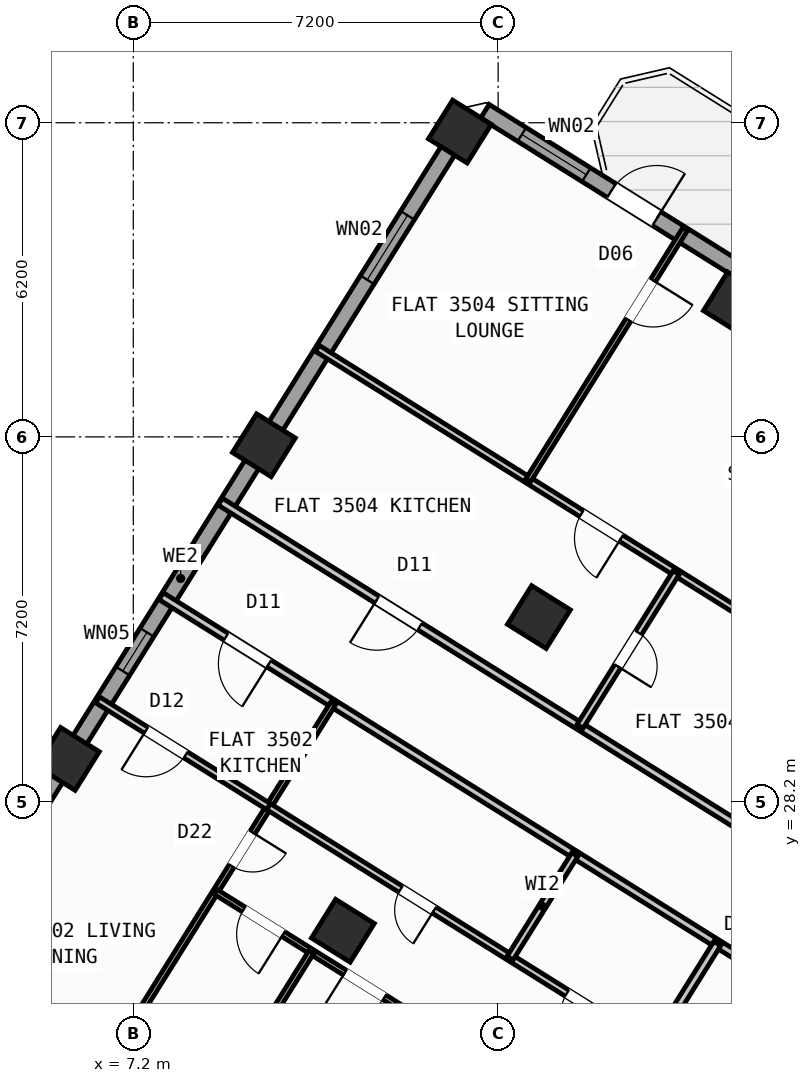
"""IFC4 building model, lengths in metres.
Left out: names, types, materials, properties, quantities, classifications, styles, units other than length and angle.
Written with IfcOpenShell. Run it as: python <this file> out.ifc"""

import sys

from ifc_helpers import new_model, si_unit, direction, frame, frame_2d, origin, origin_2d, place, context, subcontext, project, spatial, rectangle, hollow_rectangle, extrude, source, transform, mapped, element, fill, save


model = new_model("IFC4")
c1 = context("Model", 3, precision=1e-05, world=origin(), true_north=direction((0.0, 1.0)))
c2 = subcontext(c1, "Body", "Model", "MODEL_VIEW")
j1 = project(units=[si_unit("LENGTHUNIT", "METRE"), si_unit("PLANEANGLEUNIT", "RADIAN")], contexts=[c1])
p1 = place(None, origin())
s1 = spatial("IfcSite", under=j1, at=p1, CompositionType="ELEMENT")
p2 = place(p1, origin())
s2 = spatial("IfcBuilding", under=s1, at=p2, CompositionType="ELEMENT")
p3 = place(p2, frame((0.0, 0.0, 140.7)))
s3 = spatial("IfcBuildingStorey", under=s2, at=p3, CompositionType="ELEMENT", Elevation=140.7)
m1 = source(origin(), c2, "Body", "SweptSolid", [
    extrude(hollow_rectangle(XDim=0.9, YDim=0.9, WallThickness=0.036, at=origin_2d()), origin(), (0.0, 0.0, 1.0), 3.6),
])
for number, where, z_axis, x_axis in (
    (1, (19.073, 38.034, 0.0), (0.0, 0.0, 1.0), (-0.848, 0.53, 0.0)),
    (2, (15.205, 31.844, 0.0), (0.0, 0.0, 1.0), (-0.848, 0.53, 0.0)),
    (3, (11.336, 25.653, 0.0), (0.0, 0.0, 1.0), (-0.848, 0.53, 0.0)),
    (4, (13.646, 41.426, 0.0), (0.0, 0.0, 1.0), (-0.848, 0.53, 0.0)),
    (5, (9.777, 35.235, 0.0), (0.0, 0.0, 1.0), (-0.848, 0.53, 0.0)),
    (6, (5.909, 29.044, 0.0), (0.0, 0.0, 1.0), (-0.848, 0.53, 0.0)),
):
    element("IfcColumn", number, at=place(p3, frame(where, z_axis=z_axis, x_axis=x_axis)), inside=s3, PredefinedType="COLUMN", context=c2, shape_type="MappedRepresentation", body=[
        mapped(m1, transform((0.0, 0.0, 0.0), scale=1.0)),
    ])
p4 = place(p3, frame((2.415, 23.452, 0.0), z_axis=(0.0, 0.0, 1.0), x_axis=(0.52991049553, 0.848053575387, 0.0)))
e7 = element("IfcWall", 7, at=p4, inside=s3, PredefinedType="STANDARD", context=c2, shape_type="SweptSolid", body=[
    extrude(rectangle(XDim=21.587, YDim=0.32, at=frame_2d((10.794, 0.0))), origin(), (0.0, 0.0, 1.0), 2.775),
])
p5 = place(p4, frame((2.356, 0.0, 0.8)))
e8 = element("IfcOpeningElement", 8, at=p5, cuts=e7, PredefinedType="OPENING", context=c2, shape_type="SweptSolid", body=[
    extrude(rectangle(XDim=2.1, YDim=1.55, at=frame_2d((1.05, 0.775))), frame((0.0, 0.17, 0.0), z_axis=(0.0, -1.0, 0.0), x_axis=(1.0, 0.0, 0.0)), (0.0, 0.0, 1.0), 0.34),
])
p6 = place(p4, frame((8.639, 0.0, 1.0)))
e9 = element("IfcOpeningElement", 9, at=p6, cuts=e7, PredefinedType="OPENING", context=c2, shape_type="SweptSolid", body=[
    extrude(rectangle(XDim=0.9, YDim=1.25, at=frame_2d((0.45, 0.625))), frame((0.0, 0.17, 0.0), z_axis=(0.0, -1.0, 0.0), x_axis=(1.0, 0.0, 0.0)), (0.0, 0.0, 1.0), 0.34),
])
p7 = place(p4, frame((17.744, 0.0, 0.85)))
e10 = element("IfcOpeningElement", 10, at=p7, cuts=e7, PredefinedType="OPENING", context=c2, shape_type="SweptSolid", body=[
    extrude(rectangle(XDim=1.5, YDim=1.5, at=frame_2d((0.75, 0.75))), frame((0.0, 0.17, 0.0), z_axis=(0.0, -1.0, 0.0), x_axis=(1.0, 0.0, 0.0)), (0.0, 0.0, 1.0), 0.34),
])
p8 = place(p3, frame((14.138, 41.825, 0.0), z_axis=(0.0, 0.0, 1.0), x_axis=(0.848046498049, -0.529921821731, 0.0)))
e11 = element("IfcWall", 11, at=p8, inside=s3, PredefinedType="STANDARD", context=c2, shape_type="SweptSolid", body=[
    extrude(rectangle(XDim=31.588, YDim=0.32, at=frame_2d((15.794, 0.0))), origin(), (0.0, 0.0, 1.0), 3.35),
])
p9 = place(p8, frame((2.949, 0.0, 0.0)))
e12 = element("IfcOpeningElement", 12, at=p9, cuts=e11, PredefinedType="OPENING", context=c2, shape_type="SweptSolid", body=[
    extrude(rectangle(XDim=1.05, YDim=2.15, at=frame_2d((0.525, 1.075))), frame((0.0, 0.17, 0.0), z_axis=(0.0, -1.0, 0.0), x_axis=(1.0, 0.0, 0.0)), (0.0, 0.0, 1.0), 0.34),
])
p10 = place(p8, frame((0.861, 0.0, 0.85)))
e13 = element("IfcOpeningElement", 13, at=p10, cuts=e11, PredefinedType="OPENING", context=c2, shape_type="SweptSolid", body=[
    extrude(rectangle(XDim=1.5, YDim=1.5, at=frame_2d((0.75, 0.75))), frame((0.0, 0.17, 0.0), z_axis=(0.0, -1.0, 0.0), x_axis=(1.0, 0.0, 0.0)), (0.0, 0.0, 1.0), 0.34),
])
p11 = place(p8, frame((8.494, 0.0, 0.85)))
e14 = element("IfcOpeningElement", 14, at=p11, cuts=e11, PredefinedType="OPENING", context=c2, shape_type="SweptSolid", body=[
    extrude(rectangle(XDim=1.8, YDim=1.5, at=frame_2d((0.9, 0.75))), frame((0.0, 0.17, 0.0), z_axis=(0.0, -1.0, 0.0), x_axis=(1.0, 0.0, 0.0)), (0.0, 0.0, 1.0), 0.34),
])
p12 = place(p8, frame((13.874, 0.0, 0.85)))
e15 = element("IfcOpeningElement", 15, at=p12, cuts=e11, PredefinedType="OPENING", context=c2, shape_type="SweptSolid", body=[
    extrude(rectangle(XDim=1.5, YDim=1.5, at=frame_2d((0.75, 0.75))), frame((0.0, 0.17, 0.0), z_axis=(0.0, -1.0, 0.0), x_axis=(1.0, 0.0, 0.0)), (0.0, 0.0, 1.0), 0.34),
])
p13 = place(p8, frame((17.104, 0.0, 1.0)))
e16 = element("IfcOpeningElement", 16, at=p13, cuts=e11, PredefinedType="OPENING", context=c2, shape_type="SweptSolid", body=[
    extrude(rectangle(XDim=0.9, YDim=1.25, at=frame_2d((0.45, 0.625))), frame((0.0, 0.17, 0.0), z_axis=(0.0, -1.0, 0.0), x_axis=(1.0, 0.0, 0.0)), (0.0, 0.0, 1.0), 0.34),
])
p14 = place(p8, frame((22.144, 0.0, 1.0)))
e17 = element("IfcOpeningElement", 17, at=p14, cuts=e11, PredefinedType="OPENING", context=c2, shape_type="SweptSolid", body=[
    extrude(rectangle(XDim=0.9, YDim=1.25, at=frame_2d((0.45, 0.625))), frame((0.0, 0.17, 0.0), z_axis=(0.0, -1.0, 0.0), x_axis=(1.0, 0.0, 0.0)), (0.0, 0.0, 1.0), 0.34),
])
p15 = place(p8, frame((27.744, 0.0, 1.0)))
e18 = element("IfcOpeningElement", 18, at=p15, cuts=e11, PredefinedType="OPENING", context=c2, shape_type="SweptSolid", body=[
    extrude(rectangle(XDim=0.9, YDim=1.25, at=frame_2d((0.45, 0.625))), frame((0.0, 0.17, 0.0), z_axis=(0.0, -1.0, 0.0), x_axis=(1.0, 0.0, 0.0)), (0.0, 0.0, 1.0), 0.34),
])
p16 = place(p3, frame((23.104, 25.256, 0.0), z_axis=(0.0, 0.0, 1.0), x_axis=(-0.848041752158, 0.529929416617, 0.0)))
e19 = element("IfcWall", 19, at=p16, inside=s3, PredefinedType="PARTITIONING", context=c2, shape_type="SweptSolid", body=[
    extrude(rectangle(XDim=16.73, YDim=0.16, at=frame_2d((8.365, 0.0))), origin(), (0.0, 0.0, 1.0), 3.34),
])
p17 = place(p16, frame((2.22, 0.0, 0.0)))
e20 = element("IfcOpeningElement", 20, at=p17, cuts=e19, PredefinedType="OPENING", context=c2, shape_type="SweptSolid", body=[
    extrude(rectangle(XDim=0.86, YDim=2.05, at=frame_2d((0.43, 1.025))), frame((0.0, 0.09, 0.0), z_axis=(0.0, -1.0, 0.0), x_axis=(1.0, 0.0, 0.0)), (0.0, 0.0, 1.0), 0.18),
])
p18 = place(p16, frame((12.084, 0.0, 0.0)))
e21 = element("IfcOpeningElement", 21, at=p18, cuts=e19, PredefinedType="OPENING", context=c2, shape_type="SweptSolid", body=[
    extrude(rectangle(XDim=1.0, YDim=2.1, at=frame_2d((0.5, 1.05))), frame((0.0, 0.09, 0.0), z_axis=(0.0, -1.0, 0.0), x_axis=(1.0, 0.0, 0.0)), (0.0, 0.0, 1.0), 0.18),
])
p19 = place(p3, frame((21.938, 23.391, 0.0), z_axis=(0.0, 0.0, 1.0), x_axis=(-0.848045850158, 0.529922858565, 0.0)))
e22 = element("IfcWall", 22, at=p19, inside=s3, PredefinedType="PARTITIONING", context=c2, shape_type="SweptSolid", body=[
    extrude(rectangle(XDim=16.73, YDim=0.16, at=frame_2d((8.365, 0.0))), origin(), (0.0, 0.0, 1.0), 3.34),
])
p20 = place(p19, frame((2.22, 0.0, 0.0)))
e23 = element("IfcOpeningElement", 23, at=p20, cuts=e22, PredefinedType="OPENING", context=c2, shape_type="SweptSolid", body=[
    extrude(rectangle(XDim=0.86, YDim=2.05, at=frame_2d((0.43, 1.025))), frame((0.0, 0.09, 0.0), z_axis=(0.0, -1.0, 0.0), x_axis=(1.0, 0.0, 0.0)), (0.0, 0.0, 1.0), 0.18),
])
p21 = place(p19, frame((14.22, 0.0, 0.0)))
e24 = element("IfcOpeningElement", 24, at=p21, cuts=e22, PredefinedType="OPENING", context=c2, shape_type="SweptSolid", body=[
    extrude(rectangle(XDim=1.0, YDim=2.1, at=frame_2d((0.5, 1.05))), frame((0.0, 0.09, 0.0), z_axis=(0.0, -1.0, 0.0), x_axis=(1.0, 0.0, 0.0)), (0.0, 0.0, 1.0), 0.18),
])
p22 = place(p3, frame((18.724, 25.399, 0.0), z_axis=(0.0, 0.0, 1.0), x_axis=(-0.529890499457, -0.848066069705, 0.0)))
e25 = element("IfcWall", 25, at=p22, inside=s3, PredefinedType="PARTITIONING", context=c2, shape_type="SweptSolid", body=[
    extrude(rectangle(XDim=3.238, YDim=0.16, at=frame_2d((1.619, 0.0))), origin(), (0.0, 0.0, 1.0), 2.775),
])
p23 = place(p3, frame((20.624, 24.212, 0.0), z_axis=(0.0, 0.0, 1.0), x_axis=(-0.529919283494, -0.848048084121, 0.0)))
e26 = element("IfcWall", 26, at=p23, inside=s3, PredefinedType="PLUMBINGWALL", context=c2, shape_type="SweptSolid", body=[
    extrude(rectangle(XDim=5.51, YDim=0.14, at=frame_2d((2.755, 0.0))), origin(), (0.0, 0.0, 1.0), 2.995),
])
p24 = place(p23, frame((2.365, 0.0, 0.0)))
e27 = element("IfcOpeningElement", 27, at=p24, cuts=e26, PredefinedType="OPENING", context=c2, shape_type="SweptSolid", body=[
    extrude(rectangle(XDim=0.78, YDim=2.05, at=frame_2d((0.39, 1.025))), frame((0.0, 0.08, 0.0), z_axis=(0.0, -1.0, 0.0), x_axis=(1.0, 0.0, 0.0)), (0.0, 0.0, 1.0), 0.16),
])
p25 = place(p3, frame((11.143, 30.136, 0.0), z_axis=(0.0, 0.0, 1.0), x_axis=(-0.529922479612, -0.848046086956, 0.0)))
e28 = element("IfcWall", 28, at=p25, inside=s3, PredefinedType="PARTITIONING", context=c2, shape_type="SweptSolid", body=[
    extrude(rectangle(XDim=10.62, YDim=0.11, at=frame_2d((5.31, 0.0))), origin(), (0.0, 0.0, 1.0), 3.34),
])
p26 = place(p25, frame((3.0, 0.0, 0.0)))
e29 = element("IfcOpeningElement", 29, at=p26, cuts=e28, PredefinedType="OPENING", context=c2, shape_type="SweptSolid", body=[
    extrude(rectangle(XDim=0.78, YDim=2.05, at=frame_2d((0.39, 1.025))), frame((0.0, 0.065, 0.0), z_axis=(0.0, -1.0, 0.0), x_axis=(1.0, 0.0, 0.0)), (0.0, 0.0, 1.0), 0.13),
])
p27 = place(p3, frame((9.871, 28.101, 0.0), z_axis=(0.0, 0.0, 1.0), x_axis=(-0.848025873403, 0.529954826413, 0.0)))
e30 = element("IfcWall", 30, at=p27, inside=s3, PredefinedType="PLUMBINGWALL", context=c2, shape_type="SweptSolid", body=[
    extrude(rectangle(XDim=3.98, YDim=0.14, at=frame_2d((1.99, 0.0))), origin(), (0.0, 0.0, 1.0), 3.34),
])
p28 = place(p27, frame((1.93, 0.0, 0.0)))
e31 = element("IfcOpeningElement", 31, at=p28, cuts=e30, PredefinedType="OPENING", context=c2, shape_type="SweptSolid", body=[
    extrude(rectangle(XDim=0.92, YDim=2.08, at=frame_2d((0.46, 1.04))), frame((0.0, 0.08, 0.0), z_axis=(0.0, -1.0, 0.0), x_axis=(1.0, 0.0, 0.0)), (0.0, 0.0, 1.0), 0.16),
])
p29 = place(p3, frame((17.452, 23.364, 0.0), z_axis=(0.0, 0.0, 1.0), x_axis=(-0.848044326704, 0.52992529657, 0.0)))
e32 = element("IfcWall", 32, at=p29, inside=s3, PredefinedType="PLUMBINGWALL", context=c2, shape_type="SweptSolid", body=[
    extrude(rectangle(XDim=8.94, YDim=0.14, at=frame_2d((4.47, 0.0))), origin(), (0.0, 0.0, 1.0), 3.34),
])
p30 = place(p29, frame((5.087, 0.0, 0.0)))
e33 = element("IfcOpeningElement", 33, at=p30, cuts=e32, PredefinedType="OPENING", context=c2, shape_type="SweptSolid", body=[
    extrude(rectangle(XDim=0.78, YDim=2.05, at=frame_2d((0.39, 1.025))), frame((0.0, 0.08, 0.0), z_axis=(0.0, -1.0, 0.0), x_axis=(1.0, 0.0, 0.0)), (0.0, 0.0, 1.0), 0.16),
])
p31 = place(p29, frame((1.218, 0.0, 0.0)))
e34 = element("IfcOpeningElement", 34, at=p31, cuts=e32, PredefinedType="OPENING", context=c2, shape_type="SweptSolid", body=[
    extrude(rectangle(XDim=0.78, YDim=2.05, at=frame_2d((0.39, 1.025))), frame((0.0, 0.08, 0.0), z_axis=(0.0, -1.0, 0.0), x_axis=(1.0, 0.0, 0.0)), (0.0, 0.0, 1.0), 0.16),
])
p32 = place(p3, frame((15.913, 27.156, 0.0), z_axis=(0.0, 0.0, 1.0), x_axis=(-0.529935194983, -0.848038141311, 0.0)))
e35 = element("IfcWall", 35, at=p32, inside=s3, PredefinedType="PLUMBINGWALL", context=c2, shape_type="SweptSolid", body=[
    extrude(rectangle(XDim=2.41, YDim=0.14, at=frame_2d((1.205, 0.0))), origin(), (0.0, 0.0, 1.0), 3.34),
])
p33 = place(p3, frame((16.403, 21.685, 0.0), z_axis=(0.0, 0.0, 1.0), x_axis=(-0.848044326704, 0.52992529657, 0.0)))
e36 = element("IfcWall", 36, at=p33, inside=s3, PredefinedType="PARTITIONING", context=c2, shape_type="SweptSolid", body=[
    extrude(rectangle(XDim=8.94, YDim=0.11, at=frame_2d((4.47, 0.0))), origin(), (0.0, 0.0, 1.0), 3.34),
])
p34 = place(p33, frame((0.657, 0.0, 0.0)))
e37 = element("IfcOpeningElement", 37, at=p34, cuts=e36, PredefinedType="OPENING", context=c2, shape_type="SweptSolid", body=[
    extrude(rectangle(XDim=0.92, YDim=2.08, at=frame_2d((0.46, 1.04))), frame((0.0, 0.065, 0.0), z_axis=(0.0, -1.0, 0.0), x_axis=(1.0, 0.0, 0.0)), (0.0, 0.0, 1.0), 0.13),
])
p35 = place(p33, frame((2.893, 0.0, 0.0)))
e38 = element("IfcOpeningElement", 38, at=p35, cuts=e36, PredefinedType="OPENING", context=c2, shape_type="SweptSolid", body=[
    extrude(rectangle(XDim=0.92, YDim=2.08, at=frame_2d((0.46, 1.04))), frame((0.0, 0.065, 0.0), z_axis=(0.0, -1.0, 0.0), x_axis=(1.0, 0.0, 0.0)), (0.0, 0.0, 1.0), 0.13),
])
p36 = place(p33, frame((5.008, 0.0, 0.0)))
e39 = element("IfcOpeningElement", 39, at=p36, cuts=e36, PredefinedType="OPENING", context=c2, shape_type="SweptSolid", body=[
    extrude(rectangle(XDim=0.92, YDim=2.08, at=frame_2d((0.46, 1.04))), frame((0.0, 0.065, 0.0), z_axis=(0.0, -1.0, 0.0), x_axis=(1.0, 0.0, 0.0)), (0.0, 0.0, 1.0), 0.13),
])
p37 = place(p33, frame((7.363, 0.0, 0.0)))
e40 = element("IfcOpeningElement", 40, at=p37, cuts=e36, PredefinedType="OPENING", context=c2, shape_type="SweptSolid", body=[
    extrude(rectangle(XDim=0.92, YDim=2.08, at=frame_2d((0.46, 1.04))), frame((0.0, 0.065, 0.0), z_axis=(0.0, -1.0, 0.0), x_axis=(1.0, 0.0, 0.0)), (0.0, 0.0, 1.0), 0.13),
])
p38 = place(p3, frame((10.717, 25.238, 0.0), z_axis=(0.0, 0.0, 1.0), x_axis=(-0.52991804857, -0.848048855786, 0.0)))
e41 = element("IfcWall", 41, at=p38, inside=s3, PredefinedType="PARTITIONING", context=c2, shape_type="SweptSolid", body=[
    extrude(rectangle(XDim=6.24, YDim=0.11, at=frame_2d((3.12, 0.0))), origin(), (0.0, 0.0, 1.0), 3.34),
])
p39 = place(p3, frame((21.787, 30.301, 0.0), z_axis=(0.0, 0.0, 1.0), x_axis=(-0.848043949058, 0.52992590092, 0.0)))
e42 = element("IfcWall", 42, at=p39, inside=s3, PredefinedType="PLUMBINGWALL", context=c2, shape_type="SweptSolid", body=[
    extrude(rectangle(XDim=12.92, YDim=0.14, at=frame_2d((6.46, 0.0))), origin(), (0.0, 0.0, 1.0), 3.34),
])
p40 = place(p39, frame((5.849, 0.0, 0.0)))
e43 = element("IfcOpeningElement", 43, at=p40, cuts=e42, PredefinedType="OPENING", context=c2, shape_type="SweptSolid", body=[
    extrude(rectangle(XDim=0.92, YDim=2.08, at=frame_2d((0.46, 1.04))), frame((0.0, 0.08, 0.0), z_axis=(0.0, -1.0, 0.0), x_axis=(1.0, 0.0, 0.0)), (0.0, 0.0, 1.0), 0.16),
])
p41 = place(p3, frame((17.913, 32.721, 0.0), z_axis=(0.0, 0.0, 1.0), x_axis=(-0.529906983049, -0.848055770169, 0.0)))
e44 = element("IfcWall", 44, at=p41, inside=s3, PredefinedType="PLUMBINGWALL", context=c2, shape_type="SweptSolid", body=[
    extrude(rectangle(XDim=3.58, YDim=0.14, at=frame_2d((1.79, 0.0))), origin(), (0.0, 0.0, 1.0), 3.34),
])
p42 = place(p41, frame((1.4, 0.0, 0.0)))
e45 = element("IfcOpeningElement", 45, at=p42, cuts=e44, PredefinedType="OPENING", context=c2, shape_type="SweptSolid", body=[
    extrude(rectangle(XDim=0.78, YDim=2.05, at=frame_2d((0.39, 1.025))), frame((0.0, 0.08, 0.0), z_axis=(0.0, -1.0, 0.0), x_axis=(1.0, 0.0, 0.0)), (0.0, 0.0, 1.0), 0.16),
])
p43 = place(p3, frame((18.089, 39.498, 0.0), z_axis=(0.0, 0.0, 1.0), x_axis=(-0.529916267533, -0.848049968695, 0.0)))
e46 = element("IfcWall", 46, at=p43, inside=s3, PredefinedType="PARTITIONING", context=c2, shape_type="SweptSolid", body=[
    extrude(rectangle(XDim=5.84, YDim=0.11, at=frame_2d((2.92, 0.0))), origin(), (0.0, 0.0, 1.0), 3.34),
])
p44 = place(p43, frame((1.19, 0.0, 0.0)))
e47 = element("IfcOpeningElement", 47, at=p44, cuts=e46, PredefinedType="OPENING", context=c2, shape_type="SweptSolid", body=[
    extrude(rectangle(XDim=0.92, YDim=2.08, at=frame_2d((0.46, 1.04))), frame((0.0, 0.065, 0.0), z_axis=(0.0, -1.0, 0.0), x_axis=(1.0, 0.0, 0.0)), (0.0, 0.0, 1.0), 0.13),
])
m2 = source(origin(), c2, "Body", "SweptSolid", [
    extrude(rectangle(XDim=1.05, YDim=2.15, at=frame_2d((0.525, 1.075))), frame((0.0, 0.025, 0.0), z_axis=(0.0, -1.0, 0.0), x_axis=(1.0, 0.0, 0.0)), (0.0, 0.0, 1.0), 0.05),
])
p45 = place(p9, origin())
e48 = element("IfcDoor", 48, at=p45, inside=s3, OperationType="SINGLE_SWING_RIGHT", PredefinedType="DOOR", context=c2, shape_type="MappedRepresentation", body=[
    mapped(m2, transform((0.0, 0.0, 0.0), scale=1.0)),
])
fill(e12, e48)
m3 = source(origin(), c2, "Body", "SweptSolid", [
    extrude(rectangle(XDim=0.9, YDim=1.25, at=frame_2d((0.45, 0.625))), frame((0.0, 0.03, 0.0), z_axis=(0.0, -1.0, 0.0), x_axis=(1.0, 0.0, 0.0)), (0.0, 0.0, 1.0), 0.06),
])
p46 = place(p6, origin())
e49 = element("IfcWindow", 49, at=p46, inside=s3, PartitioningType="SINGLE_PANEL", PredefinedType="WINDOW", context=c2, shape_type="MappedRepresentation", body=[
    mapped(m3, transform((0.0, 0.0, 0.0), scale=1.0)),
])
fill(e9, e49)
m4 = source(origin(), c2, "Body", "SweptSolid", [
    extrude(rectangle(XDim=1.5, YDim=1.5, at=frame_2d((0.75, 0.75))), frame((0.0, 0.03, 0.0), z_axis=(0.0, -1.0, 0.0), x_axis=(1.0, 0.0, 0.0)), (0.0, 0.0, 1.0), 0.06),
])
p47 = place(p7, origin())
e50 = element("IfcWindow", 50, at=p47, inside=s3, PartitioningType="SINGLE_PANEL", PredefinedType="WINDOW", context=c2, shape_type="MappedRepresentation", body=[
    mapped(m4, transform((0.0, 0.0, 0.0), scale=1.0)),
])
fill(e10, e50)
p48 = place(p10, origin())
e51 = element("IfcWindow", 51, at=p48, inside=s3, PartitioningType="SINGLE_PANEL", PredefinedType="WINDOW", context=c2, shape_type="MappedRepresentation", body=[
    mapped(m4, transform((0.0, 0.0, 0.0), scale=1.0)),
])
fill(e13, e51)
m5 = source(origin(), c2, "Body", "SweptSolid", [
    extrude(rectangle(XDim=1.0, YDim=2.1, at=frame_2d((0.5, 1.05))), frame((0.0, 0.025, 0.0), z_axis=(0.0, -1.0, 0.0), x_axis=(1.0, 0.0, 0.0)), (0.0, 0.0, 1.0), 0.05),
])
p49 = place(p21, origin())
e52 = element("IfcDoor", 52, at=p49, inside=s3, OperationType="SINGLE_SWING_LEFT", PredefinedType="DOOR", context=c2, shape_type="MappedRepresentation", body=[
    mapped(m5, transform((0.0, 0.0, 0.0), scale=1.0)),
])
fill(e24, e52)
m6 = source(origin(), c2, "Body", "SweptSolid", [
    extrude(rectangle(XDim=0.92, YDim=2.08, at=frame_2d((0.46, 1.04))), frame((0.0, 0.025, 0.0), z_axis=(0.0, -1.0, 0.0), x_axis=(1.0, 0.0, 0.0)), (0.0, 0.0, 1.0), 0.05),
])
p50 = place(p28, origin())
e53 = element("IfcDoor", 53, at=p50, inside=s3, OperationType="SINGLE_SWING_RIGHT", PredefinedType="DOOR", context=c2, shape_type="MappedRepresentation", body=[
    mapped(m6, transform((0.0, 0.0, 0.0), scale=1.0)),
])
fill(e31, e53)
m7 = source(origin(), c2, "Body", "SweptSolid", [
    extrude(rectangle(XDim=0.78, YDim=2.05, at=frame_2d((0.39, 1.025))), frame((0.0, 0.025, 0.0), z_axis=(0.0, -1.0, 0.0), x_axis=(1.0, 0.0, 0.0)), (0.0, 0.0, 1.0), 0.05),
])
p51 = place(p26, origin())
e54 = element("IfcDoor", 54, at=p51, inside=s3, OperationType="SINGLE_SWING_LEFT", PredefinedType="DOOR", context=c2, shape_type="MappedRepresentation", body=[
    mapped(m7, transform((0.0, 0.0, 0.0), scale=1.0)),
])
fill(e29, e54)
p52 = place(p30, origin())
e55 = element("IfcDoor", 55, at=p52, inside=s3, OperationType="SINGLE_SWING_LEFT", PredefinedType="DOOR", context=c2, shape_type="MappedRepresentation", body=[
    mapped(m7, transform((0.0, 0.0, 0.0), scale=1.0)),
])
fill(e33, e55)
p53 = place(p31, origin())
e56 = element("IfcDoor", 56, at=p53, inside=s3, OperationType="SINGLE_SWING_LEFT", PredefinedType="DOOR", context=c2, shape_type="MappedRepresentation", body=[
    mapped(m7, transform((0.0, 0.0, 0.0), scale=1.0)),
])
fill(e34, e56)
p54 = place(p36, origin())
e57 = element("IfcDoor", 57, at=p54, inside=s3, OperationType="SINGLE_SWING_RIGHT", PredefinedType="DOOR", context=c2, shape_type="MappedRepresentation", body=[
    mapped(m6, transform((0.0, 0.0, 0.0), scale=1.0)),
])
fill(e39, e57)
p55 = place(p37, origin())
e58 = element("IfcDoor", 58, at=p55, inside=s3, OperationType="SINGLE_SWING_LEFT", PredefinedType="DOOR", context=c2, shape_type="MappedRepresentation", body=[
    mapped(m6, transform((0.0, 0.0, 0.0), scale=1.0)),
])
fill(e40, e58)
p56 = place(p44, origin())
e59 = element("IfcDoor", 59, at=p56, inside=s3, OperationType="SINGLE_SWING_LEFT", PredefinedType="DOOR", context=c2, shape_type="MappedRepresentation", body=[
    mapped(m6, transform((0.0, 0.0, 0.0), scale=1.0)),
])
fill(e47, e59)
p57 = place(p18, origin())
e60 = element("IfcDoor", 60, at=p57, inside=s3, OperationType="SINGLE_SWING_RIGHT", PredefinedType="DOOR", context=c2, shape_type="MappedRepresentation", body=[
    mapped(m5, transform((0.0, 0.0, 0.0), scale=1.0)),
])
fill(e21, e60)
p58 = place(p40, origin())
e61 = element("IfcDoor", 61, at=p58, inside=s3, OperationType="SINGLE_SWING_LEFT", PredefinedType="DOOR", context=c2, shape_type="MappedRepresentation", body=[
    mapped(m6, transform((0.0, 0.0, 0.0), scale=1.0)),
])
fill(e43, e61)
p59 = place(p42, origin())
e62 = element("IfcDoor", 62, at=p59, inside=s3, OperationType="SINGLE_SWING_RIGHT", PredefinedType="DOOR", context=c2, shape_type="MappedRepresentation", body=[
    mapped(m7, transform((0.0, 0.0, 0.0), scale=1.0)),
])
fill(e45, e62)
save(model, sys.argv[1])
